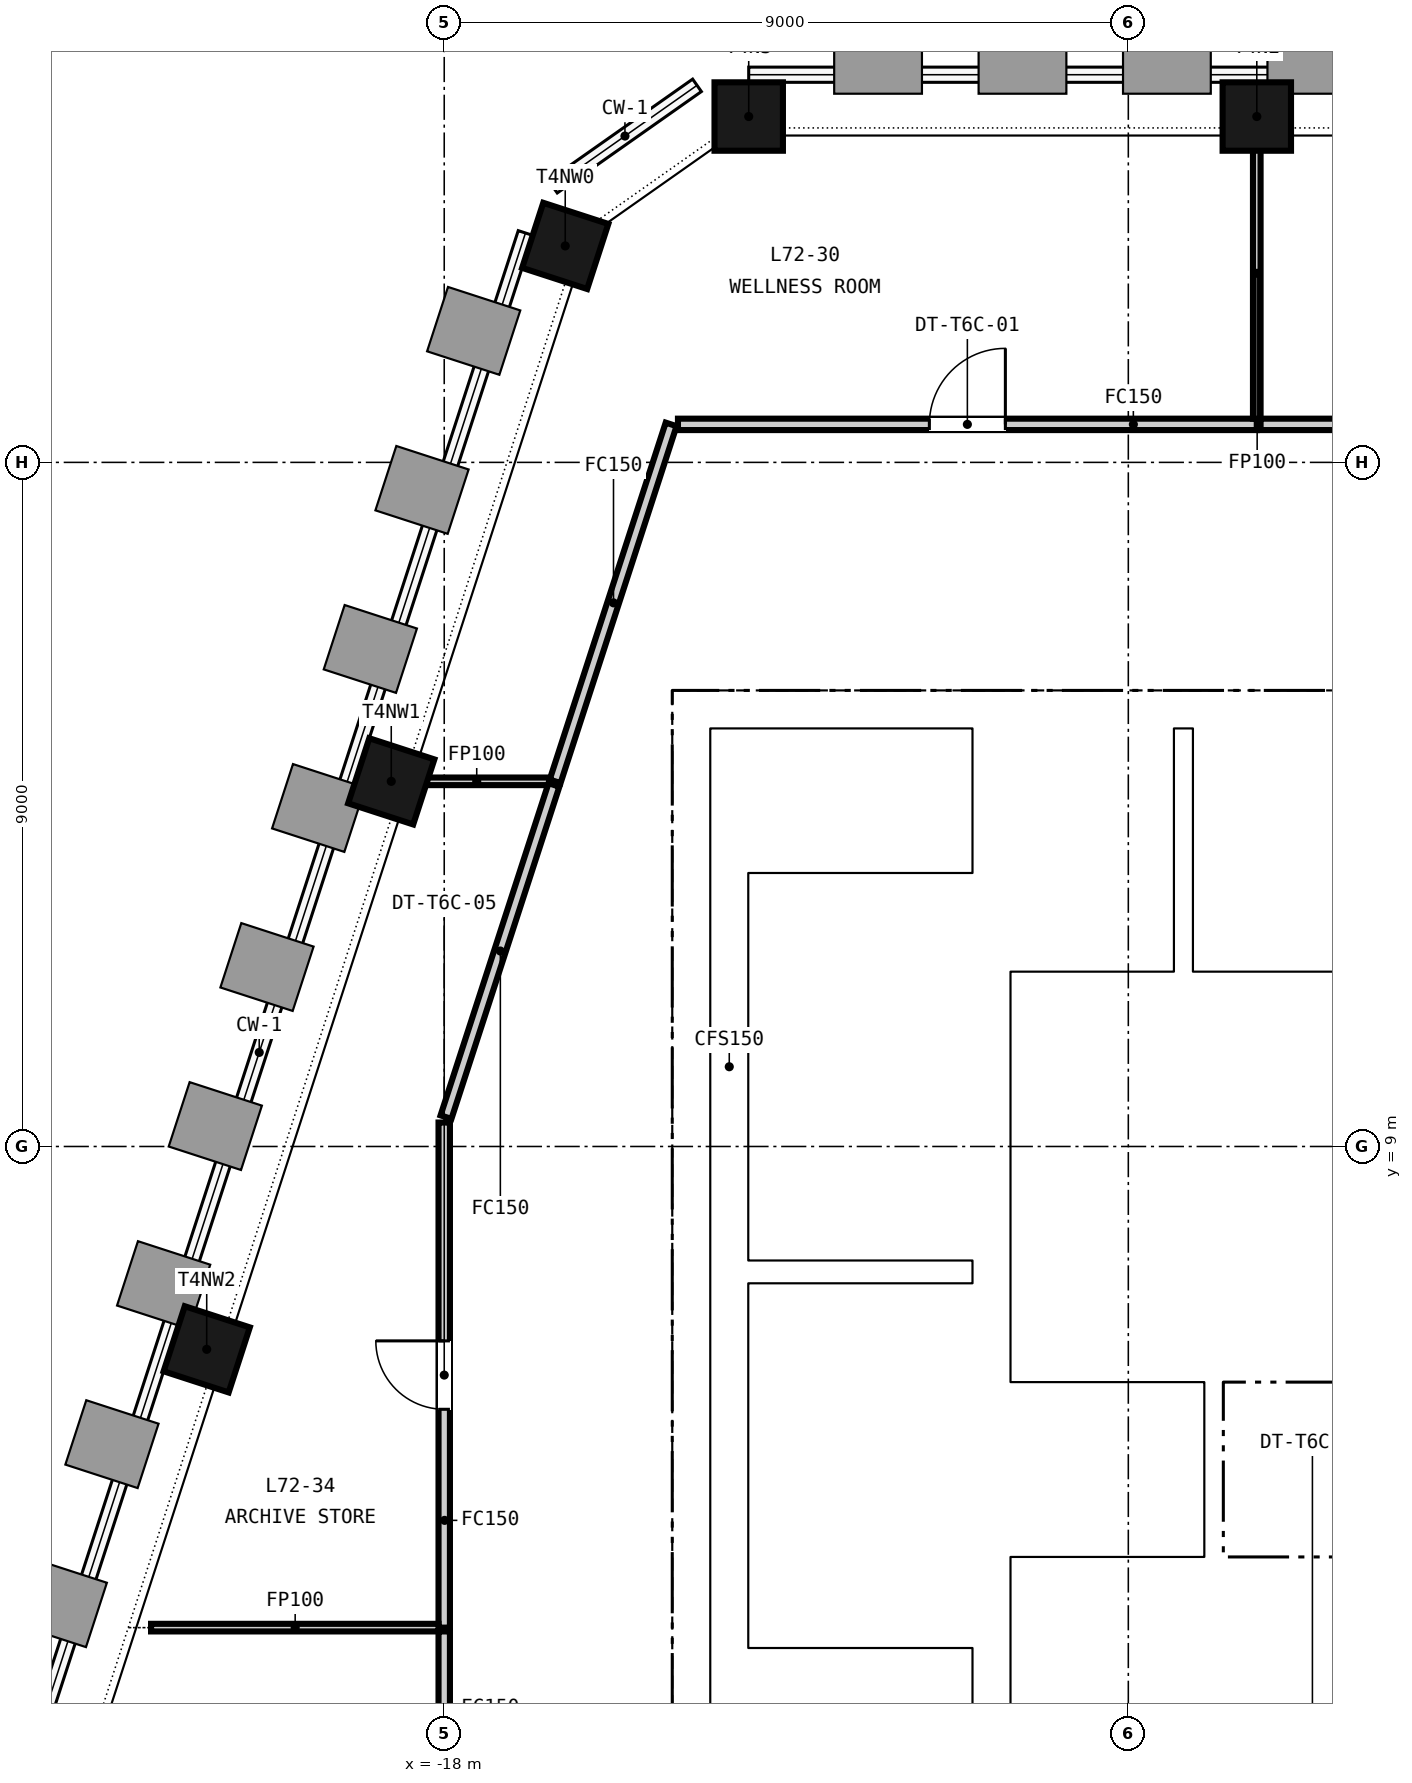
"""IFC4 building model, lengths in metres.
Left out: names, types, materials, properties, quantities, classifications, styles, units other than length and angle.
Written with IfcOpenShell. Run it as: python <this file> out.ifc"""

import sys

from ifc_helpers import new_model, si_unit, direction, frame, frame_2d, origin, origin_2d, place, context, subcontext, project, spatial, rectangle, extrude, element, fill, save


model = new_model("IFC4")
c1 = context("Model", 3, precision=1e-05, world=origin(), true_north=direction((0.0, 1.0)))
c2 = subcontext(c1, "Body", "Model", "MODEL_VIEW")
j1 = project(units=[si_unit("LENGTHUNIT", "METRE"), si_unit("PLANEANGLEUNIT", "RADIAN")], contexts=[c1])
p1 = place(None, origin())
s1 = spatial("IfcSite", under=j1, at=p1, CompositionType="ELEMENT")
p2 = place(p1, origin())
s2 = spatial("IfcBuilding", under=s1, at=p2, CompositionType="ELEMENT")
p3 = place(p2, frame((0.0, 0.0, 282.85)))
s3 = spatial("IfcBuildingStorey", under=s2, at=p3, CompositionType="ELEMENT", Elevation=282.85)
p4 = place(p3, frame((-15.0, 14.75, -0.15), z_axis=(0.0, 0.0, 1.0), x_axis=(1.0, 0.0, 0.0)))
e1 = element("IfcWall", 1, at=p4, inside=s3, PredefinedType="SOLIDWALL", context=c2, shape_type="SweptSolid", body=[
    extrude(rectangle(XDim=30.0, YDim=0.5, at=frame_2d((15.0, 0.0))), origin(), (0.0, 0.0, 1.0), 3.65),
])
p5 = place(p4, frame((9.25, 0.0, 0.15)))
e2 = element("IfcOpeningElement", 2, at=p5, cuts=e1, PredefinedType="OPENING", context=c2, shape_type="SweptSolid", body=[
    extrude(rectangle(XDim=1.5, YDim=2.1, at=frame_2d((0.75, 1.05))), frame((0.0, 0.26, 0.0), z_axis=(0.0, -1.0, 0.0), x_axis=(1.0, 0.0, 0.0)), (0.0, 0.0, 1.0), 0.52),
])
p6 = place(p4, frame((19.4, 0.0, 0.15)))
e3 = element("IfcOpeningElement", 3, at=p6, cuts=e1, PredefinedType="OPENING", context=c2, shape_type="SweptSolid", body=[
    extrude(rectangle(XDim=1.5, YDim=2.1, at=frame_2d((0.75, 1.05))), frame((0.0, 0.26, 0.0), z_axis=(0.0, -1.0, 0.0), x_axis=(1.0, 0.0, 0.0)), (0.0, 0.0, 1.0), 0.52),
])
p7 = place(p4, frame((1.5, 0.0, 0.15)))
e4 = element("IfcOpeningElement", 4, at=p7, cuts=e1, PredefinedType="OPENING", context=c2, shape_type="SweptSolid", body=[
    extrude(rectangle(XDim=1.2, YDim=2.1, at=frame_2d((0.6, 1.05))), frame((0.0, 0.26, 0.0), z_axis=(0.0, -1.0, 0.0), x_axis=(1.0, 0.0, 0.0)), (0.0, 0.0, 1.0), 0.52),
])
p8 = place(p4, frame((27.3, 0.0, 0.15)))
e5 = element("IfcOpeningElement", 5, at=p8, cuts=e1, PredefinedType="OPENING", context=c2, shape_type="SweptSolid", body=[
    extrude(rectangle(XDim=1.2, YDim=2.1, at=frame_2d((0.6, 1.05))), frame((0.0, 0.26, 0.0), z_axis=(0.0, -1.0, 0.0), x_axis=(1.0, 0.0, 0.0)), (0.0, 0.0, 1.0), 0.52),
])
for number, where, z_axis, x_axis in (
    (6, (-14.75, 0.5, -0.15), (0.0, 0.0, 1.0), (0.0, 1.0, 0.0)),
    (7, (-10.8, 0.5, -0.15), (0.0, 0.0, 1.0), (0.0, 1.0, 0.0)),
):
    element("IfcWall", number, at=place(p3, frame(where, z_axis=z_axis, x_axis=x_axis)), inside=s3, PredefinedType="SOLIDWALL", context=c2, shape_type="SweptSolid", body=[
        extrude(rectangle(XDim=14.0, YDim=0.5, at=frame_2d((7.0, 0.0))), origin(), (0.0, 0.0, 1.0), 3.65),
    ])
for number, where, z_axis, x_axis in (
    (8, (-7.31, 22.55, -0.15), (0.0, 0.0, 1.0), (-1.0, 0.0, 0.0)),
    (9, (-13.994, 22.55, -0.15), (0.0, 0.0, 1.0), (-1.0, 0.0, 0.0)),
    (10, (-16.408, 20.848, -0.15), (0.0, 0.0, 1.0), (-0.309, -0.951, 0.0)),
    (11, (-18.697, 13.804, -0.15), (0.0, 0.0, 1.0), (-0.309, -0.951, 0.0)),
    (12, (-21.125, 6.331, -0.15), (0.0, 0.0, 1.0), (-0.309, -0.951, 0.0)),
):
    element("IfcColumn", number, at=place(p3, frame(where, z_axis=z_axis, x_axis=x_axis)), inside=s3, PredefinedType="COLUMN", context=c2, shape_type="SweptSolid", body=[
        extrude(rectangle(XDim=0.9, YDim=0.9, at=origin_2d()), origin(), (0.0, 0.0, 1.0), 3.65),
    ])
p9 = place(p3, frame((-10.55, 3.5, 0.0), z_axis=(0.0, 0.0, 1.0), x_axis=(1.0, 0.0, 0.0)))
e13 = element("IfcWall", 13, at=p9, inside=s3, PredefinedType="PARTITIONING", context=c2, shape_type="SweptSolid", body=[
    extrude(rectangle(XDim=21.1, YDim=0.2, at=frame_2d((10.55, 0.0))), origin(), (0.0, 0.0, 1.0), 3.5),
])
p10 = place(p9, frame((0.675, 0.0, 0.0)))
e14 = element("IfcOpeningElement", 14, at=p10, cuts=e13, PredefinedType="OPENING", context=c2, shape_type="SweptSolid", body=[
    extrude(rectangle(XDim=1.2, YDim=2.1, at=frame_2d((0.6, 1.05))), frame((0.0, 0.11, 0.0), z_axis=(0.0, -1.0, 0.0), x_axis=(1.0, 0.0, 0.0)), (0.0, 0.0, 1.0), 0.22),
])
p11 = place(p9, frame((3.475, 0.0, 0.0)))
e15 = element("IfcOpeningElement", 15, at=p11, cuts=e13, PredefinedType="OPENING", context=c2, shape_type="SweptSolid", body=[
    extrude(rectangle(XDim=1.2, YDim=2.1, at=frame_2d((0.6, 1.05))), frame((0.0, 0.11, 0.0), z_axis=(0.0, -1.0, 0.0), x_axis=(1.0, 0.0, 0.0)), (0.0, 0.0, 1.0), 0.22),
])
p12 = place(p9, frame((6.275, 0.0, 0.0)))
e16 = element("IfcOpeningElement", 16, at=p12, cuts=e13, PredefinedType="OPENING", context=c2, shape_type="SweptSolid", body=[
    extrude(rectangle(XDim=1.2, YDim=2.1, at=frame_2d((0.6, 1.05))), frame((0.0, 0.11, 0.0), z_axis=(0.0, -1.0, 0.0), x_axis=(1.0, 0.0, 0.0)), (0.0, 0.0, 1.0), 0.22),
])
p13 = place(p9, frame((9.075, 0.0, 0.0)))
e17 = element("IfcOpeningElement", 17, at=p13, cuts=e13, PredefinedType="OPENING", context=c2, shape_type="SweptSolid", body=[
    extrude(rectangle(XDim=1.2, YDim=2.1, at=frame_2d((0.6, 1.05))), frame((0.0, 0.11, 0.0), z_axis=(0.0, -1.0, 0.0), x_axis=(1.0, 0.0, 0.0)), (0.0, 0.0, 1.0), 0.22),
])
p14 = place(p9, frame((11.875, 0.0, 0.0)))
e18 = element("IfcOpeningElement", 18, at=p14, cuts=e13, PredefinedType="OPENING", context=c2, shape_type="SweptSolid", body=[
    extrude(rectangle(XDim=1.2, YDim=2.1, at=frame_2d((0.6, 1.05))), frame((0.0, 0.11, 0.0), z_axis=(0.0, -1.0, 0.0), x_axis=(1.0, 0.0, 0.0)), (0.0, 0.0, 1.0), 0.22),
])
p15 = place(p9, frame((14.675, 0.0, 0.0)))
e19 = element("IfcOpeningElement", 19, at=p15, cuts=e13, PredefinedType="OPENING", context=c2, shape_type="SweptSolid", body=[
    extrude(rectangle(XDim=1.2, YDim=2.1, at=frame_2d((0.6, 1.05))), frame((0.0, 0.11, 0.0), z_axis=(0.0, -1.0, 0.0), x_axis=(1.0, 0.0, 0.0)), (0.0, 0.0, 1.0), 0.22),
])
p16 = place(p9, frame((17.475, 0.0, 0.0)))
e20 = element("IfcOpeningElement", 20, at=p16, cuts=e13, PredefinedType="OPENING", context=c2, shape_type="SweptSolid", body=[
    extrude(rectangle(XDim=1.2, YDim=2.1, at=frame_2d((0.6, 1.05))), frame((0.0, 0.11, 0.0), z_axis=(0.0, -1.0, 0.0), x_axis=(1.0, 0.0, 0.0)), (0.0, 0.0, 1.0), 0.22),
])
p17 = place(p9, frame((19.9, 0.0, 0.0)))
e21 = element("IfcOpeningElement", 21, at=p17, cuts=e13, PredefinedType="OPENING", context=c2, shape_type="SweptSolid", body=[
    extrude(rectangle(XDim=0.9, YDim=2.1, at=frame_2d((0.45, 1.05))), frame((0.0, 0.11, 0.0), z_axis=(0.0, -1.0, 0.0), x_axis=(1.0, 0.0, 0.0)), (0.0, 0.0, 1.0), 0.22),
])
p18 = place(p3, frame((-10.55, 6.025, 0.0), z_axis=(0.0, 0.0, 1.0), x_axis=(1.0, 0.0, 0.0)))
e22 = element("IfcWall", 22, at=p18, inside=s3, PredefinedType="PARTITIONING", context=c2, shape_type="SweptSolid", body=[
    extrude(rectangle(XDim=21.1, YDim=0.25, at=frame_2d((10.55, 0.0))), origin(), (0.0, 0.0, 1.0), 3.5),
])
p19 = place(p3, frame((-10.55, 11.2, 0.0), z_axis=(0.0, 0.0, 1.0), x_axis=(1.0, 0.0, 0.0)))
e23 = element("IfcWall", 23, at=p19, inside=s3, PredefinedType="PARTITIONING", context=c2, shape_type="SweptSolid", body=[
    extrude(rectangle(XDim=4.8, YDim=0.2, at=frame_2d((2.4, 0.0))), origin(), (0.0, 0.0, 1.0), 3.5),
])
p20 = place(p19, frame((0.525, 0.0, 0.0)))
e24 = element("IfcOpeningElement", 24, at=p20, cuts=e23, PredefinedType="OPENING", context=c2, shape_type="SweptSolid", body=[
    extrude(rectangle(XDim=1.1, YDim=2.1, at=frame_2d((0.55, 1.05))), frame((0.0, 0.11, 0.0), z_axis=(0.0, -1.0, 0.0), x_axis=(1.0, 0.0, 0.0)), (0.0, 0.0, 1.0), 0.22),
])
p21 = place(p19, frame((2.925, 0.0, 0.0)))
e25 = element("IfcOpeningElement", 25, at=p21, cuts=e23, PredefinedType="OPENING", context=c2, shape_type="SweptSolid", body=[
    extrude(rectangle(XDim=1.1, YDim=2.1, at=frame_2d((0.55, 1.05))), frame((0.0, 0.11, 0.0), z_axis=(0.0, -1.0, 0.0), x_axis=(1.0, 0.0, 0.0)), (0.0, 0.0, 1.0), 0.22),
])
p22 = place(p3, frame((-7.875, 3.6, 0.0), z_axis=(0.0, 0.0, 1.0), x_axis=(0.0, 1.0, 0.0)))
e26 = element("IfcWall", 26, at=p22, inside=s3, PredefinedType="PARTITIONING", context=c2, shape_type="SweptSolid", body=[
    extrude(rectangle(XDim=2.3, YDim=0.25, at=frame_2d((1.15, 0.0))), origin(), (0.0, 0.0, 1.0), 3.5),
])
p23 = place(p3, frame((-8.275, 11.3, 0.0), z_axis=(0.0, 0.0, 1.0), x_axis=(0.0, 1.0, 0.0)))
e27 = element("IfcWall", 27, at=p23, inside=s3, PredefinedType="PARTITIONING", context=c2, shape_type="SweptSolid", body=[
    extrude(rectangle(XDim=3.2, YDim=0.25, at=frame_2d((1.6, 0.0))), origin(), (0.0, 0.0, 1.0), 3.5),
])
p24 = place(p3, frame((-14.0, 7.35, 0.0), z_axis=(0.0, 0.0, 1.0), x_axis=(1.0, 0.0, 0.0)))
e28 = element("IfcWall", 28, at=p24, inside=s3, PredefinedType="SOLIDWALL", context=c2, shape_type="SweptSolid", body=[
    extrude(rectangle(XDim=2.95, YDim=0.3, at=frame_2d((1.475, 0.0))), origin(), (0.0, 0.0, 1.0), 3.5),
])
p25 = place(p3, frame((-14.25, 0.5, 0.0), z_axis=(0.0, 0.0, 1.0), x_axis=(0.0, 1.0, 0.0)))
e29 = element("IfcWall", 29, at=p25, inside=s3, PredefinedType="SOLIDWALL", context=c2, shape_type="SweptSolid", body=[
    extrude(rectangle(XDim=14.0, YDim=0.5, at=frame_2d((7.0, 0.0))), origin(), (0.0, 0.0, 1.0), 3.5),
])
p26 = place(p3, frame((-16.541, 13.804, 0.0), z_axis=(0.0, 0.0, 1.0), x_axis=(0.309069302416, 0.951039518792, 0.0)))
e30 = element("IfcWall", 30, at=p26, inside=s3, PredefinedType="PARTITIONING", context=c2, shape_type="SweptSolid", body=[
    extrude(rectangle(XDim=4.938, YDim=0.15, at=frame_2d((2.469, 0.0))), origin(), (0.0, 0.0, 1.0), 2.75),
])
p27 = place(p3, frame((-14.925, 18.5, 0.0), z_axis=(0.0, 0.0, 1.0), x_axis=(1.0, 0.0, 0.0)))
e31 = element("IfcWall", 31, at=p27, inside=s3, PredefinedType="PARTITIONING", context=c2, shape_type="SweptSolid", body=[
    extrude(rectangle(XDim=7.615, YDim=0.15, at=frame_2d((3.808, 0.0))), origin(), (0.0, 0.0, 1.0), 2.75),
])
p28 = place(p27, frame((3.308, 0.0, 0.0)))
e32 = element("IfcOpeningElement", 32, at=p28, cuts=e31, PredefinedType="OPENING", context=c2, shape_type="SweptSolid", body=[
    extrude(rectangle(XDim=1.0, YDim=2.1, at=frame_2d((0.5, 1.05))), frame((0.0, 0.085, 0.0), z_axis=(0.0, -1.0, 0.0), x_axis=(1.0, 0.0, 0.0)), (0.0, 0.0, 1.0), 0.17),
])
p29 = place(p3, frame((-7.31, 18.575, 0.0), z_axis=(0.0, 0.0, 1.0), x_axis=(0.0, 1.0, 0.0)))
e33 = element("IfcWall", 33, at=p29, inside=s3, PredefinedType="PARTITIONING", context=c2, shape_type="SweptSolid", body=[
    extrude(rectangle(XDim=3.825, YDim=0.1, at=frame_2d((1.913, 0.0))), origin(), (0.0, 0.0, 1.0), 2.75),
])
p30 = place(p3, frame((-18.539, 13.804, 0.0), z_axis=(0.0, 0.0, 1.0), x_axis=(1.0, 0.0, 0.0)))
e34 = element("IfcWall", 34, at=p30, inside=s3, PredefinedType="PARTITIONING", context=c2, shape_type="SweptSolid", body=[
    extrude(rectangle(XDim=1.923, YDim=0.1, at=frame_2d((0.961, 0.0))), origin(), (0.0, 0.0, 1.0), 2.75),
])
p31 = place(p3, frame((-7.26, 18.5, 0.0), z_axis=(0.0, 0.0, 1.0), x_axis=(1.0, 0.0, 0.0)))
e35 = element("IfcWall", 35, at=p31, inside=s3, PredefinedType="PARTITIONING", context=c2, shape_type="SweptSolid", body=[
    extrude(rectangle(XDim=7.085, YDim=0.15, at=frame_2d((3.542, 0.0))), origin(), (0.0, 0.0, 1.0), 2.75),
])
p32 = place(p31, frame((3.042, 0.0, 0.0)))
e36 = element("IfcOpeningElement", 36, at=p32, cuts=e35, PredefinedType="OPENING", context=c2, shape_type="SweptSolid", body=[
    extrude(rectangle(XDim=1.0, YDim=2.1, at=frame_2d((0.5, 1.05))), frame((0.0, 0.085, 0.0), z_axis=(0.0, -1.0, 0.0), x_axis=(1.0, 0.0, 0.0)), (0.0, 0.0, 1.0), 0.17),
])
p33 = place(p3, frame((-18.0, 2.67, 0.0), z_axis=(0.0, 0.0, 1.0), x_axis=(0.0, 1.0, 0.0)))
e37 = element("IfcWall", 37, at=p33, inside=s3, PredefinedType="PARTITIONING", context=c2, shape_type="SweptSolid", body=[
    extrude(rectangle(XDim=6.645, YDim=0.15, at=frame_2d((3.323, 0.0))), origin(), (0.0, 0.0, 1.0), 2.75),
])
p34 = place(p33, frame((2.873, 0.0, 0.0)))
e38 = element("IfcOpeningElement", 38, at=p34, cuts=e37, PredefinedType="OPENING", context=c2, shape_type="SweptSolid", body=[
    extrude(rectangle(XDim=0.9, YDim=2.1, at=frame_2d((0.45, 1.05))), frame((0.0, 0.085, 0.0), z_axis=(0.0, -1.0, 0.0), x_axis=(1.0, 0.0, 0.0)), (0.0, 0.0, 1.0), 0.17),
])
p35 = place(p3, frame((-17.977, 9.386, 0.0), z_axis=(0.0, 0.0, 1.0), x_axis=(0.309110099354, 0.951026259615, 0.0)))
e39 = element("IfcWall", 39, at=p35, inside=s3, PredefinedType="PARTITIONING", context=c2, shape_type="SweptSolid", body=[
    extrude(rectangle(XDim=4.595, YDim=0.15, at=frame_2d((2.298, 0.0))), origin(), (0.0, 0.0, 1.0), 2.75),
])
p36 = place(p3, frame((-21.857, 2.67, 0.0), z_axis=(0.0, 0.0, 1.0), x_axis=(1.0, 0.0, 0.0)))
e40 = element("IfcWall", 40, at=p36, inside=s3, PredefinedType="PARTITIONING", context=c2, shape_type="SweptSolid", body=[
    extrude(rectangle(XDim=3.782, YDim=0.1, at=frame_2d((1.891, 0.0))), origin(), (0.0, 0.0, 1.0), 2.75),
])
p37 = place(p3, frame((-18.0, -3.325, 0.0), z_axis=(0.0, 0.0, 1.0), x_axis=(0.0, 1.0, 0.0)))
e41 = element("IfcWall", 41, at=p37, inside=s3, PredefinedType="PARTITIONING", context=c2, shape_type="SweptSolid", body=[
    extrude(rectangle(XDim=5.945, YDim=0.15, at=frame_2d((2.973, 0.0))), origin(), (0.0, 0.0, 1.0), 2.75),
])
p38 = place(p37, frame((2.073, 0.0, 0.0)))
e42 = element("IfcOpeningElement", 42, at=p38, cuts=e41, PredefinedType="OPENING", context=c2, shape_type="SweptSolid", body=[
    extrude(rectangle(XDim=1.8, YDim=2.1, at=frame_2d((0.9, 1.05))), frame((0.0, 0.085, 0.0), z_axis=(0.0, -1.0, 0.0), x_axis=(1.0, 0.0, 0.0)), (0.0, 0.0, 1.0), 0.17),
])
p39 = place(p10, origin())
e43 = element("IfcDoor", 43, at=p39, inside=s3, OperationType="DOUBLE_DOOR_SLIDING", PredefinedType="DOOR", context=c2, shape_type="SweptSolid", body=[
    extrude(rectangle(XDim=1.2, YDim=2.1, at=frame_2d((0.6, 1.05))), frame((0.0, 0.025, 0.0), z_axis=(0.0, -1.0, 0.0), x_axis=(1.0, 0.0, 0.0)), (0.0, 0.0, 1.0), 0.05),
])
fill(e14, e43)
p40 = place(p11, origin())
e44 = element("IfcDoor", 44, at=p40, inside=s3, OperationType="DOUBLE_DOOR_SLIDING", PredefinedType="DOOR", context=c2, shape_type="SweptSolid", body=[
    extrude(rectangle(XDim=1.2, YDim=2.1, at=frame_2d((0.6, 1.05))), frame((0.0, 0.025, 0.0), z_axis=(0.0, -1.0, 0.0), x_axis=(1.0, 0.0, 0.0)), (0.0, 0.0, 1.0), 0.05),
])
fill(e15, e44)
p41 = place(p20, origin())
e45 = element("IfcDoor", 45, at=p41, inside=s3, OperationType="DOUBLE_DOOR_SLIDING", PredefinedType="DOOR", context=c2, shape_type="SweptSolid", body=[
    extrude(rectangle(XDim=1.1, YDim=2.1, at=frame_2d((0.55, 1.05))), frame((0.0, 0.025, 0.0), z_axis=(0.0, -1.0, 0.0), x_axis=(1.0, 0.0, 0.0)), (0.0, 0.0, 1.0), 0.05),
])
fill(e24, e45)
p42 = place(p21, origin())
e46 = element("IfcDoor", 46, at=p42, inside=s3, OperationType="DOUBLE_DOOR_SLIDING", PredefinedType="DOOR", context=c2, shape_type="SweptSolid", body=[
    extrude(rectangle(XDim=1.1, YDim=2.1, at=frame_2d((0.55, 1.05))), frame((0.0, 0.025, 0.0), z_axis=(0.0, -1.0, 0.0), x_axis=(1.0, 0.0, 0.0)), (0.0, 0.0, 1.0), 0.05),
])
fill(e25, e46)
p43 = place(p7, origin())
e47 = element("IfcDoor", 47, at=p43, inside=s3, OperationType="SINGLE_SWING_RIGHT", PredefinedType="DOOR", context=c2, shape_type="SweptSolid", body=[
    extrude(rectangle(XDim=1.2, YDim=2.1, at=frame_2d((0.6, 1.05))), frame((0.0, 0.025, 0.0), z_axis=(0.0, -1.0, 0.0), x_axis=(1.0, 0.0, 0.0)), (0.0, 0.0, 1.0), 0.05),
])
fill(e4, e47)
p44 = place(p28, origin())
e48 = element("IfcDoor", 48, at=p44, inside=s3, OperationType="SINGLE_SWING_RIGHT", PredefinedType="DOOR", context=c2, shape_type="SweptSolid", body=[
    extrude(rectangle(XDim=1.0, YDim=2.1, at=frame_2d((0.5, 1.05))), frame((0.0, 0.025, 0.0), z_axis=(0.0, -1.0, 0.0), x_axis=(1.0, 0.0, 0.0)), (0.0, 0.0, 1.0), 0.05),
])
fill(e32, e48)
p45 = place(p34, origin())
e49 = element("IfcDoor", 49, at=p45, inside=s3, OperationType="SINGLE_SWING_RIGHT", PredefinedType="DOOR", context=c2, shape_type="SweptSolid", body=[
    extrude(rectangle(XDim=0.9, YDim=2.1, at=frame_2d((0.45, 1.05))), frame((0.0, 0.025, 0.0), z_axis=(0.0, -1.0, 0.0), x_axis=(1.0, 0.0, 0.0)), (0.0, 0.0, 1.0), 0.05),
])
fill(e38, e49)
save(model, sys.argv[1])
